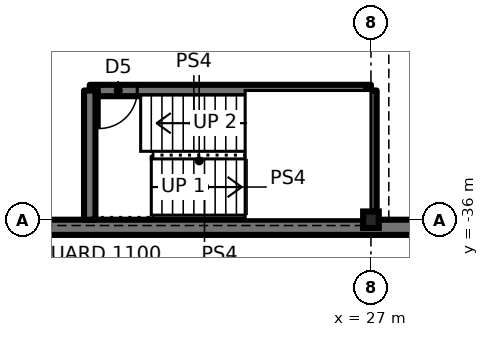
"""IFC4 building model, lengths in metres.
Left out: names, types, materials, properties, quantities, classifications, styles, units other than length and angle.
Written with IfcOpenShell. Run it as: python <this file> out.ifc"""

import sys

from ifc_helpers import new_model, si_unit, direction, frame, frame_2d, origin, origin_2d, place, context, subcontext, project, spatial, rectangle, i_section, extrude, element, fill, save


model = new_model("IFC4")
c1 = context("Model", 3, precision=1e-05, world=origin(), true_north=direction((0.0, 1.0)))
c2 = subcontext(c1, "Body", "Model", "MODEL_VIEW")
j1 = project(units=[si_unit("LENGTHUNIT", "METRE"), si_unit("PLANEANGLEUNIT", "RADIAN")], contexts=[c1])
p1 = place(None, origin())
s1 = spatial("IfcSite", under=j1, at=p1, CompositionType="ELEMENT")
p2 = place(p1, origin())
s2 = spatial("IfcBuilding", under=s1, at=p2, CompositionType="ELEMENT")
p3 = place(p2, frame((0.0, 0.0, -3.6)))
s3 = spatial("IfcBuildingStorey", under=s2, at=p3, CompositionType="ELEMENT", Elevation=-3.6)
p4 = place(p3, frame((27.0, -36.0, 0.0), z_axis=(0.0, 0.0, 1.0), x_axis=(1.0, 0.0, 0.0)))
e1 = element("IfcColumn", 1, at=p4, inside=s3, PredefinedType="COLUMN", context=c2, shape_type="SweptSolid", body=[
    extrude(i_section(OverallWidth=0.411, OverallDepth=0.434, WebThickness=0.036, FlangeThickness=0.057, at=origin_2d()), origin(), (0.0, 0.0, 1.0), 3.6),
])
p5 = place(p3, frame((-36.2, -36.2, 0.0), z_axis=(0.0, 0.0, 1.0), x_axis=(1.0, 0.0, 0.0)))
e2 = element("IfcWall", 2, at=p5, inside=s3, PredefinedType="SOLIDWALL", context=c2, shape_type="SweptSolid", body=[
    extrude(rectangle(XDim=126.4, YDim=0.4, at=frame_2d((63.2, 0.0))), origin(), (0.0, 0.0, 1.0), 2.581),
])
p6 = place(p3, frame((19.6, -32.6, 0.0), z_axis=(0.0, 0.0, 1.0), x_axis=(1.0, 0.0, 0.0)))
e3 = element("IfcWall", 3, at=p6, inside=s3, PredefinedType="SOLIDWALL", context=c2, shape_type="SweptSolid", body=[
    extrude(rectangle(XDim=7.4, YDim=0.3, at=frame_2d((3.7, 0.0))), origin(), (0.0, 0.0, 1.0), 3.6),
])
p7 = place(p6, frame((0.25, 0.0, 0.0)))
e4 = element("IfcOpeningElement", 4, at=p7, cuts=e3, PredefinedType="OPENING", context=c2, shape_type="SweptSolid", body=[
    extrude(rectangle(XDim=1.0, YDim=2.1, at=frame_2d((0.5, 1.05))), frame((0.0, 0.16, 0.0), z_axis=(0.0, -1.0, 0.0), x_axis=(1.0, 0.0, 0.0)), (0.0, 0.0, 1.0), 0.32),
])
p8 = place(p3, frame((27.0, -35.783, 0.0), z_axis=(0.0, 0.0, 1.0), x_axis=(0.0, 1.0, 0.0)))
e5 = element("IfcWall", 5, at=p8, inside=s3, PredefinedType="SOLIDWALL", context=c2, shape_type="SweptSolid", body=[
    extrude(rectangle(XDim=3.183, YDim=0.3, at=frame_2d((1.591, 0.0))), origin(), (0.0, 0.0, 1.0), 3.6),
])
p9 = place(p3, frame((19.6, -36.0, 0.0), z_axis=(0.0, 0.0, 1.0), x_axis=(0.0, 1.0, 0.0)))
e6 = element("IfcWall", 6, at=p9, inside=s3, PredefinedType="SOLIDWALL", context=c2, shape_type="SweptSolid", body=[
    extrude(rectangle(XDim=3.4, YDim=0.3, at=frame_2d((1.7, 0.0))), origin(), (0.0, 0.0, 1.0), 3.6),
])
p10 = place(p7, frame((1.0, 0.0, 0.0), z_axis=(0.0, 0.0, 1.0), x_axis=(-1.0, 0.0, 0.0)))
e7 = element("IfcDoor", 7, at=p10, inside=s3, OperationType="SINGLE_SWING_RIGHT", PredefinedType="DOOR", context=c2, shape_type="SweptSolid", body=[
    extrude(rectangle(XDim=1.0, YDim=2.1, at=frame_2d((0.5, 1.05))), frame((0.0, 0.025, 0.0), z_axis=(0.0, -1.0, 0.0), x_axis=(1.0, 0.0, 0.0)), (0.0, 0.0, 1.0), 0.05),
])
fill(e4, e7)
save(model, sys.argv[1])
